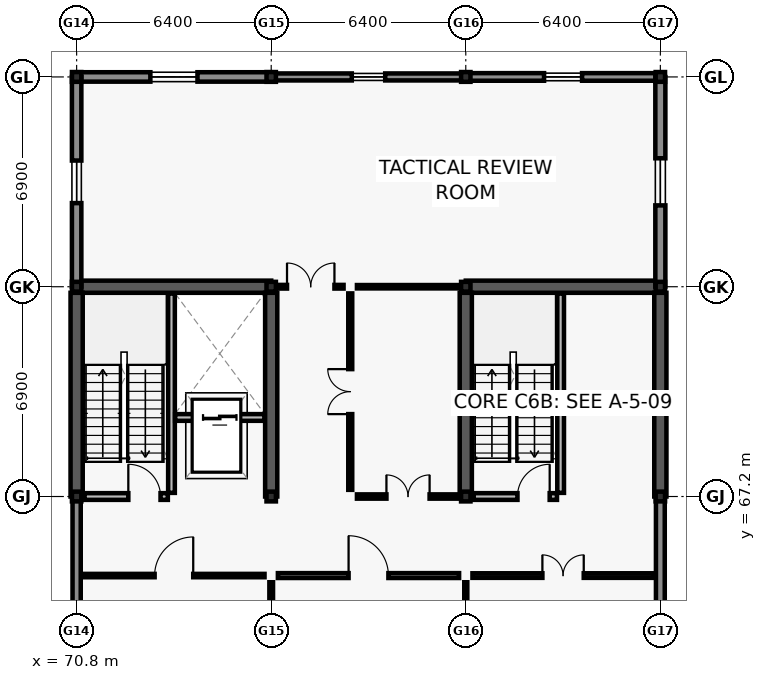
"""IFC4 building model, lengths in metres.
Left out: names, types, materials, properties, quantities, classifications, styles, units other than length and angle.
Written with IfcOpenShell. Run it as: python <this file> out.ifc"""

import sys

from ifc_helpers import new_model, si_unit, direction, frame, frame_2d, origin, origin_2d, place, context, subcontext, project, spatial, rectangle, i_section, extrude, element, fill, save


model = new_model("IFC4")
c1 = context("Model", 3, precision=1e-05, world=origin(), true_north=direction((0.0, 1.0)))
c2 = subcontext(c1, "Body", "Model", "MODEL_VIEW")
j1 = project(units=[si_unit("LENGTHUNIT", "METRE"), si_unit("PLANEANGLEUNIT", "RADIAN")], contexts=[c1])
p1 = place(None, origin())
s1 = spatial("IfcSite", under=j1, at=p1, CompositionType="ELEMENT")
p2 = place(p1, origin())
s2 = spatial("IfcBuilding", under=s1, at=p2, CompositionType="ELEMENT")
p3 = place(p2, frame((0.0, 0.0, 13.5)))
s3 = spatial("IfcBuildingStorey", under=s2, at=p3, CompositionType="ELEMENT", Elevation=13.5)
for number, where, z_axis, x_axis in (
    (1, (70.8, 67.2, 0.0), (0.0, 0.0, 1.0), (1.0, 0.0, 0.0)),
    (2, (70.8, 74.1, 0.0), (0.0, 0.0, 1.0), (1.0, 0.0, 0.0)),
    (3, (70.8, 81.0, 0.0), (0.0, 0.0, 1.0), (1.0, 0.0, 0.0)),
    (4, (77.2, 67.2, 0.0), (0.0, 0.0, 1.0), (1.0, 0.0, 0.0)),
    (5, (77.2, 74.1, 0.0), (0.0, 0.0, 1.0), (1.0, 0.0, 0.0)),
    (6, (77.2, 81.0, 0.0), (0.0, 0.0, 1.0), (1.0, 0.0, 0.0)),
    (7, (83.6, 67.2, 0.0), (0.0, 0.0, 1.0), (1.0, 0.0, 0.0)),
    (8, (83.6, 74.1, 0.0), (0.0, 0.0, 1.0), (1.0, 0.0, 0.0)),
    (9, (83.6, 81.0, 0.0), (0.0, 0.0, 1.0), (1.0, 0.0, 0.0)),
    (10, (90.0, 67.2, 0.0), (0.0, 0.0, 1.0), (1.0, 0.0, 0.0)),
    (11, (90.0, 74.1, 0.0), (0.0, 0.0, 1.0), (1.0, 0.0, 0.0)),
    (12, (90.0, 81.0, 0.0), (0.0, 0.0, 1.0), (1.0, 0.0, 0.0)),
):
    element("IfcColumn", number, at=place(p3, frame(where, z_axis=z_axis, x_axis=x_axis)), inside=s3, PredefinedType="COLUMN", context=c2, shape_type="SweptSolid", body=[
        extrude(i_section(OverallWidth=0.309, OverallDepth=0.321, WebThickness=0.014, FlangeThickness=0.022, FilletRadius=0.017, at=origin_2d()), origin(), (0.0, 0.0, 1.0), 3.9),
    ])
p4 = place(p3, frame((70.8, 74.1, 0.0), z_axis=(0.0, 0.0, 1.0), x_axis=(1.0, 0.0, 0.0)))
e13 = element("IfcWall", 13, at=p4, inside=s3, PredefinedType="SHEAR", context=c2, shape_type="SweptSolid", body=[
    extrude(rectangle(XDim=6.4, YDim=0.4, at=frame_2d((3.2, 0.0))), origin(), (0.0, 0.0, 1.0), 3.66),
])
for number, where, z_axis, x_axis in (
    (14, (70.8, 67.2, 0.0), (0.0, 0.0, 1.0), (0.0, 1.0, 0.0)),
    (15, (77.2, 67.2, 0.0), (0.0, 0.0, 1.0), (0.0, 1.0, 0.0)),
):
    element("IfcWall", number, at=place(p3, frame(where, z_axis=z_axis, x_axis=x_axis)), inside=s3, PredefinedType="SHEAR", context=c2, shape_type="SweptSolid", body=[
        extrude(rectangle(XDim=6.7, YDim=0.4, at=frame_2d((3.35, 0.0))), origin(), (0.0, 0.0, 1.0), 3.66),
    ])
p5 = place(p3, frame((83.6, 74.1, 0.0), z_axis=(0.0, 0.0, 1.0), x_axis=(1.0, 0.0, 0.0)))
e16 = element("IfcWall", 16, at=p5, inside=s3, PredefinedType="SHEAR", context=c2, shape_type="SweptSolid", body=[
    extrude(rectangle(XDim=6.4, YDim=0.4, at=frame_2d((3.2, 0.0))), origin(), (0.0, 0.0, 1.0), 3.66),
])
for number, where, z_axis, x_axis in (
    (17, (83.6, 67.2, 0.0), (0.0, 0.0, 1.0), (0.0, 1.0, 0.0)),
    (18, (90.0, 67.2, 0.0), (0.0, 0.0, 1.0), (0.0, 1.0, 0.0)),
):
    element("IfcWall", number, at=place(p3, frame(where, z_axis=z_axis, x_axis=x_axis)), inside=s3, PredefinedType="SHEAR", context=c2, shape_type="SweptSolid", body=[
        extrude(rectangle(XDim=6.7, YDim=0.4, at=frame_2d((3.35, 0.0))), origin(), (0.0, 0.0, 1.0), 3.66),
    ])
p6 = place(p3, frame((70.805, 81.0, 0.0), z_axis=(0.0, 0.0, 1.0), x_axis=(1.0, 0.0, 0.0)))
e19 = element("IfcWall", 19, at=p6, inside=s3, PredefinedType="SOLIDWALL", context=c2, shape_type="SweptSolid", body=[
    extrude(rectangle(XDim=6.39, YDim=0.31, at=frame_2d((3.195, 0.0))), origin(), (0.0, 0.0, 1.0), 3.02),
])
p7 = place(p6, frame((2.42, 0.0, 0.8)))
e20 = element("IfcOpeningElement", 20, at=p7, cuts=e19, PredefinedType="OPENING", context=c2, shape_type="SweptSolid", body=[
    extrude(rectangle(XDim=1.55, YDim=1.5, at=frame_2d((0.775, 0.75))), frame((0.0, 0.165, 0.0), z_axis=(0.0, -1.0, 0.0), x_axis=(1.0, 0.0, 0.0)), (0.0, 0.0, 1.0), 0.33),
])
p8 = place(p3, frame((77.205, 81.0, 0.0), z_axis=(0.0, 0.0, 1.0), x_axis=(1.0, 0.0, 0.0)))
e21 = element("IfcWall", 21, at=p8, inside=s3, PredefinedType="SOLIDWALL", context=c2, shape_type="SweptSolid", body=[
    extrude(rectangle(XDim=6.39, YDim=0.23, at=frame_2d((3.195, 0.0))), origin(), (0.0, 0.0, 1.0), 3.02),
])
p9 = place(p8, frame((2.645, 0.0, 0.8)))
e22 = element("IfcOpeningElement", 22, at=p9, cuts=e21, PredefinedType="OPENING", context=c2, shape_type="SweptSolid", body=[
    extrude(rectangle(XDim=1.1, YDim=1.65, at=frame_2d((0.55, 0.825))), frame((0.0, 0.125, 0.0), z_axis=(0.0, -1.0, 0.0), x_axis=(1.0, 0.0, 0.0)), (0.0, 0.0, 1.0), 0.25),
])
p10 = place(p3, frame((83.605, 81.0, 0.0), z_axis=(0.0, 0.0, 1.0), x_axis=(1.0, 0.0, 0.0)))
e23 = element("IfcWall", 23, at=p10, inside=s3, PredefinedType="SOLIDWALL", context=c2, shape_type="SweptSolid", body=[
    extrude(rectangle(XDim=6.39, YDim=0.25, at=frame_2d((3.195, 0.0))), origin(), (0.0, 0.0, 1.0), 3.02),
])
p11 = place(p10, frame((2.57, 0.0, 0.8)))
e24 = element("IfcOpeningElement", 24, at=p11, cuts=e23, PredefinedType="OPENING", context=c2, shape_type="SweptSolid", body=[
    extrude(rectangle(XDim=1.25, YDim=1.65, at=frame_2d((0.625, 0.825))), frame((0.0, 0.135, 0.0), z_axis=(0.0, -1.0, 0.0), x_axis=(1.0, 0.0, 0.0)), (0.0, 0.0, 1.0), 0.27),
])
p12 = place(p3, frame((70.8, 60.305, 0.0), z_axis=(0.0, 0.0, 1.0), x_axis=(0.0, 1.0, 0.0)))
e25 = element("IfcWall", 25, at=p12, inside=s3, PredefinedType="SOLIDWALL", context=c2, shape_type="SweptSolid", body=[
    extrude(rectangle(XDim=6.89, YDim=0.27, at=frame_2d((3.445, 0.0))), origin(), (0.0, 0.0, 1.0), 3.02),
])
p13 = place(p3, frame((90.0, 67.195, 0.0), z_axis=(0.0, 0.0, 1.0), x_axis=(0.0, -1.0, 0.0)))
e26 = element("IfcWall", 26, at=p13, inside=s3, PredefinedType="SOLIDWALL", context=c2, shape_type="SweptSolid", body=[
    extrude(rectangle(XDim=6.89, YDim=0.29, at=frame_2d((3.445, 0.0))), origin(), (0.0, 0.0, 1.0), 3.02),
])
p14 = place(p3, frame((70.8, 74.105, 0.0), z_axis=(0.0, 0.0, 1.0), x_axis=(0.0, 1.0, 0.0)))
e27 = element("IfcWall", 27, at=p14, inside=s3, PredefinedType="SOLIDWALL", context=c2, shape_type="SweptSolid", body=[
    extrude(rectangle(XDim=6.89, YDim=0.31, at=frame_2d((3.445, 0.0))), origin(), (0.0, 0.0, 1.0), 3.02),
])
p15 = place(p14, frame((2.745, 0.0, 0.8)))
e28 = element("IfcOpeningElement", 28, at=p15, cuts=e27, PredefinedType="OPENING", context=c2, shape_type="SweptSolid", body=[
    extrude(rectangle(XDim=1.4, YDim=1.65, at=frame_2d((0.7, 0.825))), frame((0.0, 0.165, 0.0), z_axis=(0.0, -1.0, 0.0), x_axis=(1.0, 0.0, 0.0)), (0.0, 0.0, 1.0), 0.33),
])
p16 = place(p3, frame((90.0, 80.995, 0.0), z_axis=(0.0, 0.0, 1.0), x_axis=(0.0, -1.0, 0.0)))
e29 = element("IfcWall", 29, at=p16, inside=s3, PredefinedType="SOLIDWALL", context=c2, shape_type="SweptSolid", body=[
    extrude(rectangle(XDim=6.89, YDim=0.33, at=frame_2d((3.445, 0.0))), origin(), (0.0, 0.0, 1.0), 3.02),
])
p17 = place(p16, frame((2.67, 0.0, 0.8)))
e30 = element("IfcOpeningElement", 30, at=p17, cuts=e29, PredefinedType="OPENING", context=c2, shape_type="SweptSolid", body=[
    extrude(rectangle(XDim=1.55, YDim=1.65, at=frame_2d((0.775, 0.825))), frame((0.0, 0.175, 0.0), z_axis=(0.0, -1.0, 0.0), x_axis=(1.0, 0.0, 0.0)), (0.0, 0.0, 1.0), 0.35),
])
p18 = place(p3, frame((73.92, 67.32, 0.0), z_axis=(0.0, 0.0, 1.0), x_axis=(0.0, 1.0, 0.0)))
e31 = element("IfcWall", 31, at=p18, inside=s3, PredefinedType="SOLIDWALL", context=c2, shape_type="SweptSolid", body=[
    extrude(rectangle(XDim=6.555, YDim=0.22, at=frame_2d((3.277, 0.0))), origin(), (0.0, 0.0, 1.0), 3.66),
])
p19 = place(p3, frame((71.06, 67.2, 0.0), z_axis=(0.0, 0.0, 1.0), x_axis=(1.0, 0.0, 0.0)))
e32 = element("IfcWall", 32, at=p19, inside=s3, PredefinedType="SOLIDWALL", context=c2, shape_type="SweptSolid", body=[
    extrude(rectangle(XDim=2.74, YDim=0.22, at=frame_2d((1.37, 0.0))), origin(), (0.0, 0.0, 1.0), 3.02),
])
p20 = place(p19, frame((1.44, 0.0, 0.0)))
e33 = element("IfcOpeningElement", 33, at=p20, cuts=e32, PredefinedType="OPENING", context=c2, shape_type="SweptSolid", body=[
    extrude(rectangle(XDim=1.06, YDim=2.1, at=frame_2d((0.53, 1.05))), frame((0.0, 0.12, 0.0), z_axis=(0.0, -1.0, 0.0), x_axis=(1.0, 0.0, 0.0)), (0.0, 0.0, 1.0), 0.24),
])
p21 = place(p3, frame((74.04, 69.8, 0.0), z_axis=(0.0, 0.0, 1.0), x_axis=(1.0, 0.0, 0.0)))
e34 = element("IfcWall", 34, at=p21, inside=s3, PredefinedType="SOLIDWALL", context=c2, shape_type="SweptSolid", body=[
    extrude(rectangle(XDim=2.935, YDim=0.22, at=frame_2d((1.468, 0.0))), origin(), (0.0, 0.0, 1.0), 3.66),
])
p22 = place(p21, frame((0.917, 0.0, 0.0)))
e35 = element("IfcOpeningElement", 35, at=p22, cuts=e34, PredefinedType="OPENING", context=c2, shape_type="SweptSolid", body=[
    extrude(rectangle(XDim=1.1, YDim=2.1, at=frame_2d((0.55, 1.05))), frame((0.0, 0.12, 0.0), z_axis=(0.0, -1.0, 0.0), x_axis=(1.0, 0.0, 0.0)), (0.0, 0.0, 1.0), 0.24),
])
p23 = place(p3, frame((86.72, 67.32, 0.0), z_axis=(0.0, 0.0, 1.0), x_axis=(0.0, 1.0, 0.0)))
e36 = element("IfcWall", 36, at=p23, inside=s3, PredefinedType="SOLIDWALL", context=c2, shape_type="SweptSolid", body=[
    extrude(rectangle(XDim=6.555, YDim=0.22, at=frame_2d((3.277, 0.0))), origin(), (0.0, 0.0, 1.0), 3.66),
])
p24 = place(p3, frame((83.86, 67.2, 0.0), z_axis=(0.0, 0.0, 1.0), x_axis=(1.0, 0.0, 0.0)))
e37 = element("IfcWall", 37, at=p24, inside=s3, PredefinedType="SOLIDWALL", context=c2, shape_type="SweptSolid", body=[
    extrude(rectangle(XDim=2.74, YDim=0.22, at=frame_2d((1.37, 0.0))), origin(), (0.0, 0.0, 1.0), 3.02),
])
p25 = place(p24, frame((1.44, 0.0, 0.0)))
e38 = element("IfcOpeningElement", 38, at=p25, cuts=e37, PredefinedType="OPENING", context=c2, shape_type="SweptSolid", body=[
    extrude(rectangle(XDim=1.06, YDim=2.1, at=frame_2d((0.53, 1.05))), frame((0.0, 0.12, 0.0), z_axis=(0.0, -1.0, 0.0), x_axis=(1.0, 0.0, 0.0)), (0.0, 0.0, 1.0), 0.24),
])
p26 = place(p3, frame((77.2, 60.52, 0.0), z_axis=(0.0, 0.0, 1.0), x_axis=(0.0, 1.0, 0.0)))
e39 = element("IfcWall", 39, at=p26, inside=s3, PredefinedType="PARTITIONING", context=c2, shape_type="SweptSolid", body=[
    extrude(rectangle(XDim=3.86, YDim=0.12, at=frame_2d((1.93, 0.0))), origin(), (0.0, 0.0, 1.0), 3.0),
])
p27 = place(p3, frame((71.02, 64.6, 0.0), z_axis=(0.0, 0.0, 1.0), x_axis=(1.0, 0.0, 0.0)))
e40 = element("IfcWall", 40, at=p27, inside=s3, PredefinedType="PARTITIONING", context=c2, shape_type="SweptSolid", body=[
    extrude(rectangle(XDim=5.96, YDim=0.11, at=frame_2d((2.98, 0.0))), origin(), (0.0, 0.0, 1.0), 3.0),
])
p28 = place(p27, frame((2.345, 0.0, 0.0)))
e41 = element("IfcOpeningElement", 41, at=p28, cuts=e40, PredefinedType="OPENING", context=c2, shape_type="SweptSolid", body=[
    extrude(rectangle(XDim=1.27, YDim=2.1, at=frame_2d((0.635, 1.05))), frame((0.0, 0.065, 0.0), z_axis=(0.0, -1.0, 0.0), x_axis=(1.0, 0.0, 0.0)), (0.0, 0.0, 1.0), 0.13),
])
p29 = place(p3, frame((83.6, 60.52, 0.0), z_axis=(0.0, 0.0, 1.0), x_axis=(0.0, 1.0, 0.0)))
e42 = element("IfcWall", 42, at=p29, inside=s3, PredefinedType="PARTITIONING", context=c2, shape_type="SweptSolid", body=[
    extrude(rectangle(XDim=3.86, YDim=0.1, at=frame_2d((1.93, 0.0))), origin(), (0.0, 0.0, 1.0), 3.0),
])
p30 = place(p3, frame((77.42, 64.6, 0.0), z_axis=(0.0, 0.0, 1.0), x_axis=(1.0, 0.0, 0.0)))
e43 = element("IfcWall", 43, at=p30, inside=s3, PredefinedType="PARTITIONING", context=c2, shape_type="SweptSolid", body=[
    extrude(rectangle(XDim=5.96, YDim=0.16, at=frame_2d((2.98, 0.0))), origin(), (0.0, 0.0, 1.0), 3.0),
])
p31 = place(p30, frame((2.325, 0.0, 0.0)))
e44 = element("IfcOpeningElement", 44, at=p31, cuts=e43, PredefinedType="OPENING", context=c2, shape_type="SweptSolid", body=[
    extrude(rectangle(XDim=1.31, YDim=2.14, at=frame_2d((0.655, 1.07))), frame((0.0, 0.09, 0.0), z_axis=(0.0, -1.0, 0.0), x_axis=(1.0, 0.0, 0.0)), (0.0, 0.0, 1.0), 0.18),
])
p32 = place(p3, frame((83.82, 64.6, 0.0), z_axis=(0.0, 0.0, 1.0), x_axis=(1.0, 0.0, 0.0)))
e45 = element("IfcWall", 45, at=p32, inside=s3, PredefinedType="PARTITIONING", context=c2, shape_type="SweptSolid", body=[
    extrude(rectangle(XDim=5.96, YDim=0.15, at=frame_2d((2.98, 0.0))), origin(), (0.0, 0.0, 1.0), 3.0),
])
p33 = place(p32, frame((2.3, 0.0, 0.0)))
e46 = element("IfcOpeningElement", 46, at=p33, cuts=e45, PredefinedType="OPENING", context=c2, shape_type="SweptSolid", body=[
    extrude(rectangle(XDim=1.36, YDim=2.15, at=frame_2d((0.68, 1.075))), frame((0.0, 0.085, 0.0), z_axis=(0.0, -1.0, 0.0), x_axis=(1.0, 0.0, 0.0)), (0.0, 0.0, 1.0), 0.17),
])
p34 = place(p3, frame((80.02, 67.2, 0.0), z_axis=(0.0, 0.0, 1.0), x_axis=(1.0, 0.0, 0.0)))
e47 = element("IfcWall", 47, at=p34, inside=s3, PredefinedType="PARTITIONING", context=c2, shape_type="SweptSolid", body=[
    extrude(rectangle(XDim=3.36, YDim=0.14, at=frame_2d((1.68, 0.0))), origin(), (0.0, 0.0, 1.0), 3.0),
])
p35 = place(p34, frame((0.97, 0.0, 0.0)))
e48 = element("IfcOpeningElement", 48, at=p35, cuts=e47, PredefinedType="OPENING", context=c2, shape_type="SweptSolid", body=[
    extrude(rectangle(XDim=1.42, YDim=2.15, at=frame_2d((0.71, 1.075))), frame((0.0, 0.08, 0.0), z_axis=(0.0, -1.0, 0.0), x_axis=(1.0, 0.0, 0.0)), (0.0, 0.0, 1.0), 0.16),
])
p36 = place(p3, frame((79.8, 67.42, 0.0), z_axis=(0.0, 0.0, 1.0), x_axis=(0.0, 1.0, 0.0)))
e49 = element("IfcWall", 49, at=p36, inside=s3, PredefinedType="PARTITIONING", context=c2, shape_type="SweptSolid", body=[
    extrude(rectangle(XDim=6.46, YDim=0.13, at=frame_2d((3.23, 0.0))), origin(), (0.0, 0.0, 1.0), 3.0),
])
p37 = place(p36, frame((2.49, 0.0, 0.0)))
e50 = element("IfcOpeningElement", 50, at=p37, cuts=e49, PredefinedType="OPENING", context=c2, shape_type="SweptSolid", body=[
    extrude(rectangle(XDim=1.48, YDim=2.18, at=frame_2d((0.74, 1.09))), frame((0.0, 0.075, 0.0), z_axis=(0.0, -1.0, 0.0), x_axis=(1.0, 0.0, 0.0)), (0.0, 0.0, 1.0), 0.15),
])
p38 = place(p3, frame((77.42, 74.1, 0.0), z_axis=(0.0, 0.0, 1.0), x_axis=(1.0, 0.0, 0.0)))
e51 = element("IfcWall", 51, at=p38, inside=s3, PredefinedType="PARTITIONING", context=c2, shape_type="SweptSolid", body=[
    extrude(rectangle(XDim=2.16, YDim=0.12, at=frame_2d((1.08, 0.0))), origin(), (0.0, 0.0, 1.0), 3.0),
])
p39 = place(p38, frame((0.3, 0.0, 0.0)))
e52 = element("IfcOpeningElement", 52, at=p39, cuts=e51, PredefinedType="OPENING", context=c2, shape_type="SweptSolid", body=[
    extrude(rectangle(XDim=1.56, YDim=2.18, at=frame_2d((0.78, 1.09))), frame((0.0, 0.07, 0.0), z_axis=(0.0, -1.0, 0.0), x_axis=(1.0, 0.0, 0.0)), (0.0, 0.0, 1.0), 0.14),
])
p40 = place(p3, frame((80.02, 74.1, 0.0), z_axis=(0.0, 0.0, 1.0), x_axis=(1.0, 0.0, 0.0)))
e53 = element("IfcWall", 53, at=p40, inside=s3, PredefinedType="PARTITIONING", context=c2, shape_type="SweptSolid", body=[
    extrude(rectangle(XDim=3.36, YDim=0.11, at=frame_2d((1.68, 0.0))), origin(), (0.0, 0.0, 1.0), 3.0),
])
p41 = place(p7, origin())
e54 = element("IfcWindow", 54, at=p41, inside=s3, PartitioningType="SINGLE_PANEL", PredefinedType="WINDOW", context=c2, shape_type="SweptSolid", body=[
    extrude(rectangle(XDim=1.55, YDim=1.5, at=frame_2d((0.775, 0.75))), frame((0.0, 0.03, 0.0), z_axis=(0.0, -1.0, 0.0), x_axis=(1.0, 0.0, 0.0)), (0.0, 0.0, 1.0), 0.06),
])
fill(e20, e54)
p42 = place(p9, origin())
e55 = element("IfcWindow", 55, at=p42, inside=s3, PartitioningType="SINGLE_PANEL", PredefinedType="WINDOW", context=c2, shape_type="SweptSolid", body=[
    extrude(rectangle(XDim=1.1, YDim=1.65, at=frame_2d((0.55, 0.825))), frame((0.0, 0.03, 0.0), z_axis=(0.0, -1.0, 0.0), x_axis=(1.0, 0.0, 0.0)), (0.0, 0.0, 1.0), 0.06),
])
fill(e22, e55)
p43 = place(p11, origin())
e56 = element("IfcWindow", 56, at=p43, inside=s3, PartitioningType="SINGLE_PANEL", PredefinedType="WINDOW", context=c2, shape_type="SweptSolid", body=[
    extrude(rectangle(XDim=1.25, YDim=1.65, at=frame_2d((0.625, 0.825))), frame((0.0, 0.03, 0.0), z_axis=(0.0, -1.0, 0.0), x_axis=(1.0, 0.0, 0.0)), (0.0, 0.0, 1.0), 0.06),
])
fill(e24, e56)
p44 = place(p15, origin())
e57 = element("IfcWindow", 57, at=p44, inside=s3, PartitioningType="SINGLE_PANEL", PredefinedType="WINDOW", context=c2, shape_type="SweptSolid", body=[
    extrude(rectangle(XDim=1.4, YDim=1.65, at=frame_2d((0.7, 0.825))), frame((0.0, 0.03, 0.0), z_axis=(0.0, -1.0, 0.0), x_axis=(1.0, 0.0, 0.0)), (0.0, 0.0, 1.0), 0.06),
])
fill(e28, e57)
p45 = place(p17, origin())
e58 = element("IfcWindow", 58, at=p45, inside=s3, PartitioningType="SINGLE_PANEL", PredefinedType="WINDOW", context=c2, shape_type="SweptSolid", body=[
    extrude(rectangle(XDim=1.55, YDim=1.65, at=frame_2d((0.775, 0.825))), frame((0.0, 0.03, 0.0), z_axis=(0.0, -1.0, 0.0), x_axis=(1.0, 0.0, 0.0)), (0.0, 0.0, 1.0), 0.06),
])
fill(e30, e58)
p46 = place(p20, origin())
e59 = element("IfcDoor", 59, at=p46, inside=s3, OperationType="SINGLE_SWING_LEFT", PredefinedType="DOOR", context=c2, shape_type="SweptSolid", body=[
    extrude(rectangle(XDim=1.06, YDim=2.1, at=frame_2d((0.53, 1.05))), frame((0.0, 0.025, 0.0), z_axis=(0.0, -1.0, 0.0), x_axis=(1.0, 0.0, 0.0)), (0.0, 0.0, 1.0), 0.05),
])
fill(e33, e59)
p47 = place(p22, origin())
e60 = element("IfcDoor", 60, at=p47, inside=s3, OperationType="DOUBLE_DOOR_SLIDING", PredefinedType="DOOR", context=c2, shape_type="SweptSolid", body=[
    extrude(rectangle(XDim=1.1, YDim=2.1, at=frame_2d((0.55, 1.05))), frame((0.0, 0.025, 0.0), z_axis=(0.0, -1.0, 0.0), x_axis=(1.0, 0.0, 0.0)), (0.0, 0.0, 1.0), 0.05),
])
fill(e35, e60)
p48 = place(p25, origin())
e61 = element("IfcDoor", 61, at=p48, inside=s3, OperationType="SINGLE_SWING_RIGHT", PredefinedType="DOOR", context=c2, shape_type="SweptSolid", body=[
    extrude(rectangle(XDim=1.06, YDim=2.1, at=frame_2d((0.53, 1.05))), frame((0.0, 0.025, 0.0), z_axis=(0.0, -1.0, 0.0), x_axis=(1.0, 0.0, 0.0)), (0.0, 0.0, 1.0), 0.05),
])
fill(e38, e61)
p49 = place(p28, origin())
e62 = element("IfcDoor", 62, at=p49, inside=s3, OperationType="SINGLE_SWING_RIGHT", PredefinedType="DOOR", context=c2, shape_type="SweptSolid", body=[
    extrude(rectangle(XDim=1.27, YDim=2.1, at=frame_2d((0.635, 1.05))), frame((0.0, 0.025, 0.0), z_axis=(0.0, -1.0, 0.0), x_axis=(1.0, 0.0, 0.0)), (0.0, 0.0, 1.0), 0.05),
])
fill(e41, e62)
p50 = place(p31, origin())
e63 = element("IfcDoor", 63, at=p50, inside=s3, OperationType="SINGLE_SWING_LEFT", PredefinedType="DOOR", context=c2, shape_type="SweptSolid", body=[
    extrude(rectangle(XDim=1.31, YDim=2.14, at=frame_2d((0.655, 1.07))), frame((0.0, 0.025, 0.0), z_axis=(0.0, -1.0, 0.0), x_axis=(1.0, 0.0, 0.0)), (0.0, 0.0, 1.0), 0.05),
])
fill(e44, e63)
p51 = place(p33, origin())
e64 = element("IfcDoor", 64, at=p51, inside=s3, OperationType="DOUBLE_DOOR_SINGLE_SWING", PredefinedType="DOOR", context=c2, shape_type="SweptSolid", body=[
    extrude(rectangle(XDim=1.36, YDim=2.15, at=frame_2d((0.68, 1.075))), frame((0.0, 0.025, 0.0), z_axis=(0.0, -1.0, 0.0), x_axis=(1.0, 0.0, 0.0)), (0.0, 0.0, 1.0), 0.05),
])
fill(e46, e64)
p52 = place(p35, origin())
e65 = element("IfcDoor", 65, at=p52, inside=s3, OperationType="DOUBLE_DOOR_SINGLE_SWING", PredefinedType="DOOR", context=c2, shape_type="SweptSolid", body=[
    extrude(rectangle(XDim=1.42, YDim=2.15, at=frame_2d((0.71, 1.075))), frame((0.0, 0.025, 0.0), z_axis=(0.0, -1.0, 0.0), x_axis=(1.0, 0.0, 0.0)), (0.0, 0.0, 1.0), 0.05),
])
fill(e48, e65)
p53 = place(p37, origin())
e66 = element("IfcDoor", 66, at=p53, inside=s3, OperationType="DOUBLE_DOOR_SINGLE_SWING", PredefinedType="DOOR", context=c2, shape_type="SweptSolid", body=[
    extrude(rectangle(XDim=1.48, YDim=2.18, at=frame_2d((0.74, 1.09))), frame((0.0, 0.025, 0.0), z_axis=(0.0, -1.0, 0.0), x_axis=(1.0, 0.0, 0.0)), (0.0, 0.0, 1.0), 0.05),
])
fill(e50, e66)
p54 = place(p39, origin())
e67 = element("IfcDoor", 67, at=p54, inside=s3, OperationType="DOUBLE_DOOR_SINGLE_SWING", PredefinedType="DOOR", context=c2, shape_type="SweptSolid", body=[
    extrude(rectangle(XDim=1.56, YDim=2.18, at=frame_2d((0.78, 1.09))), frame((0.0, 0.025, 0.0), z_axis=(0.0, -1.0, 0.0), x_axis=(1.0, 0.0, 0.0)), (0.0, 0.0, 1.0), 0.05),
])
fill(e52, e67)
save(model, sys.argv[1])
